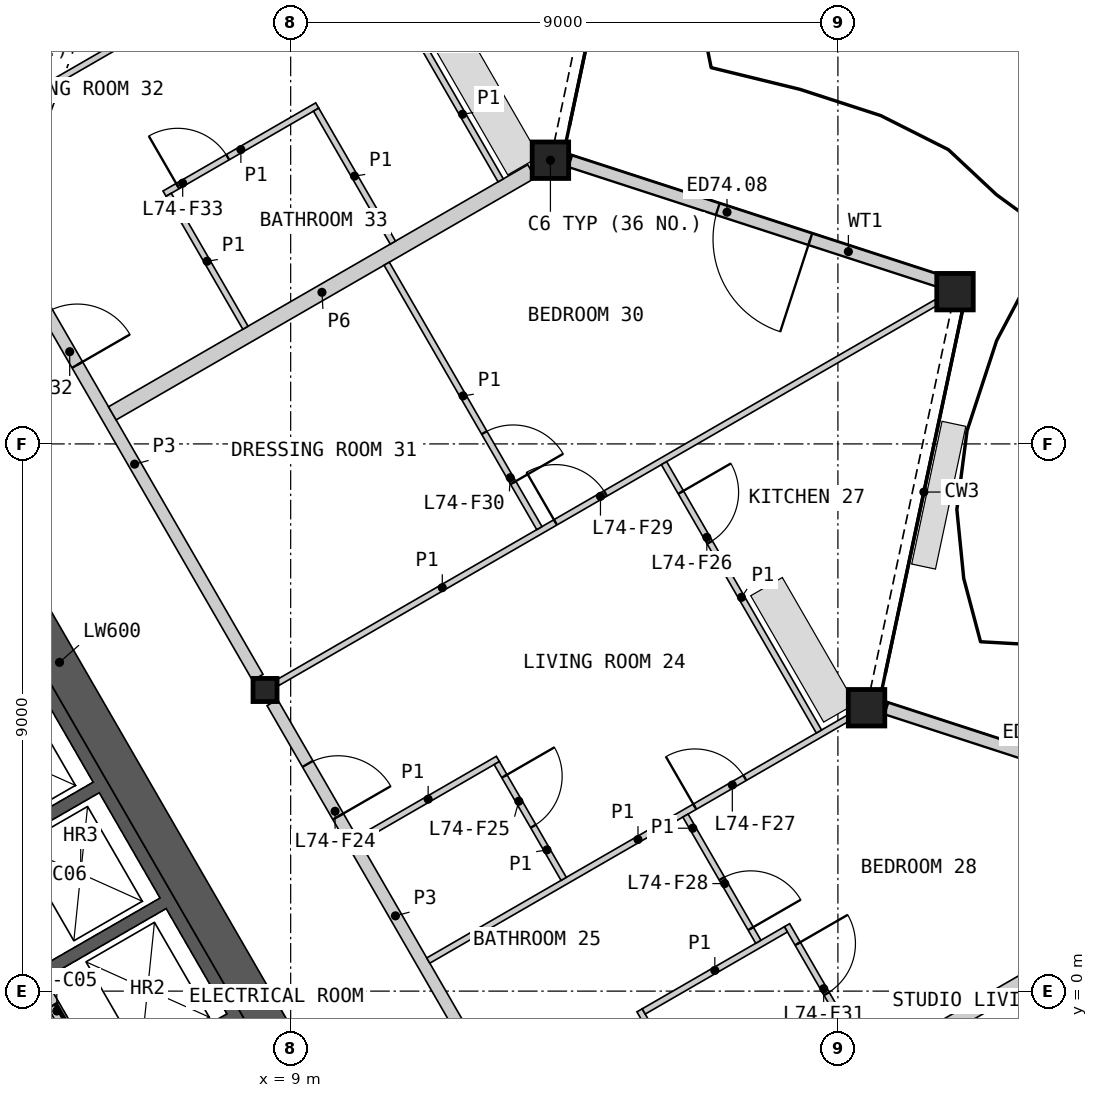
"""IFC4 building model, lengths in metres.
Left out: names, types, materials, properties, quantities, classifications, styles, units other than length and angle.
Written with IfcOpenShell. Run it as: python <this file> out.ifc"""

import sys

from ifc_helpers import new_model, si_unit, direction, frame, frame_2d, origin, origin_2d, place, context, subcontext, project, spatial, polyline, rectangle, hollow_rectangle, i_section, outline, extrude, element, fill, save


model = new_model("IFC4")
c1 = context("Model", 3, precision=1e-05, world=origin(), true_north=direction((0.0, 1.0)))
c2 = subcontext(c1, "Body", "Model", "MODEL_VIEW")
j1 = project(units=[si_unit("LENGTHUNIT", "METRE"), si_unit("PLANEANGLEUNIT", "RADIAN")], contexts=[c1])
p1 = place(None, origin())
s1 = spatial("IfcSite", under=j1, at=p1, CompositionType="ELEMENT")
p2 = place(p1, origin())
s2 = spatial("IfcBuilding", under=s1, at=p2, CompositionType="ELEMENT")
p3 = place(p2, frame((0.0, 0.0, 332.4)))
s3 = spatial("IfcBuildingStorey", under=s2, at=p3, CompositionType="ELEMENT", Elevation=332.4)
for number, where, z_axis, x_axis in (
    (1, (18.471, 4.661, 0.0), (0.0, 0.0, 1.0), (1.0, 0.0, 0.0)),
    (2, (19.926, 11.504, 0.0), (0.0, 0.0, 1.0), (1.0, 0.0, 0.0)),
    (3, (13.272, 13.666, 0.0), (0.0, 0.0, 1.0), (1.0, 0.0, 0.0)),
):
    element("IfcColumn", number, at=place(p3, frame(where, z_axis=z_axis, x_axis=x_axis)), inside=s3, PredefinedType="COLUMN", context=c2, shape_type="SweptSolid", body=[
        extrude(hollow_rectangle(XDim=0.6, YDim=0.6, WallThickness=0.04, at=origin_2d()), origin(), (0.0, 0.0, 1.0), 3.4),
    ])
p4 = place(p3, frame((8.578, 4.953, 0.0), z_axis=(0.0, 0.0, 1.0), x_axis=(1.0, 0.0, 0.0)))
e4 = element("IfcColumn", 4, at=p4, inside=s3, PredefinedType="COLUMN", context=c2, shape_type="SweptSolid", body=[
    extrude(i_section(OverallWidth=0.396, OverallDepth=0.381, WebThickness=0.019, FlangeThickness=0.03, at=origin_2d()), origin(), (0.0, 0.0, 1.0), 3.4),
])
p5 = place(p3, frame((24.893, 2.667, 0.0), z_axis=(0.0, 0.0, 1.0), x_axis=(-0.951058691075, 0.309010301012, 0.0)))
e5 = element("IfcWall", 5, at=p5, inside=s3, PredefinedType="SOLIDWALL", context=c2, shape_type="SweptSolid", body=[
    extrude(rectangle(XDim=6.411, YDim=0.2, at=frame_2d((3.206, 0.0))), origin(), (0.0, 0.0, 1.0), 2.488),
])
p6 = place(p5, frame((2.262, 0.0, 0.0)))
e6 = element("IfcOpeningElement", 6, at=p6, cuts=e5, PredefinedType="OPENING", context=c2, shape_type="SweptSolid", body=[
    extrude(rectangle(XDim=1.6, YDim=2.25, at=frame_2d((0.8, 1.125))), frame((0.0, 0.11, 0.0), z_axis=(0.0, -1.0, 0.0), x_axis=(1.0, 0.0, 0.0)), (0.0, 0.0, 1.0), 0.22),
])
p7 = place(p3, frame((19.697, 11.667, 0.0), z_axis=(0.0, 0.0, 1.0), x_axis=(-0.951053926112, 0.309024966026, 0.0)))
e7 = element("IfcWall", 7, at=p7, inside=s3, PredefinedType="SOLIDWALL", context=c2, shape_type="SweptSolid", body=[
    extrude(rectangle(XDim=6.414, YDim=0.2, at=frame_2d((3.207, 0.0))), origin(), (0.0, 0.0, 1.0), 2.488),
])
p8 = place(p7, frame((2.262, 0.0, 0.0)))
e8 = element("IfcOpeningElement", 8, at=p8, cuts=e7, PredefinedType="OPENING", context=c2, shape_type="SweptSolid", body=[
    extrude(rectangle(XDim=1.6, YDim=2.25, at=frame_2d((0.8, 1.125))), frame((0.0, 0.11, 0.0), z_axis=(0.0, -1.0, 0.0), x_axis=(1.0, 0.0, 0.0)), (0.0, 0.0, 1.0), 0.22),
])
p9 = place(p3, origin())
e9 = element("IfcWall", 9, at=p9, inside=s3, PredefinedType="SHEAR", context=c2, shape_type="SweptSolid", body=[
    extrude(outline(polyline([(1.561, 6.097), (3.731, 7.35), (8.231, -0.444), (6.061, -1.697), (5.96, -1.524), (7.952, -0.374), (6.952, 1.358), (4.96, 0.208), (4.861, 0.381), (6.852, 1.531), (5.852, 3.263), (3.861, 2.113), (3.76, 2.287), (5.752, 3.437), (4.752, 5.169), (2.76, 4.019), (2.66, 4.192), (4.652, 5.342), (3.652, 7.074), (1.66, 5.924), (1.561, 6.097)])), origin(), (0.0, 0.0, 1.0), 3.1),
])
p10 = place(p3, frame((5.817, -1.476, 0.0), z_axis=(0.0, 0.0, 1.0), x_axis=(-0.500002616675, 0.866023893041, 0.0)))
e10 = element("IfcWall", 10, at=p10, inside=s3, PredefinedType="SOLIDWALL", context=c2, shape_type="SweptSolid", body=[
    extrude(rectangle(XDim=8.373, YDim=0.2, at=frame_2d((4.187, 0.0))), origin(), (0.0, 0.0, 1.0), 3.1),
])
p11 = place(p10, frame((0.337, 0.0, 0.0)))
e11 = element("IfcOpeningElement", 11, at=p11, cuts=e10, PredefinedType="OPENING", context=c2, shape_type="SweptSolid", body=[
    extrude(rectangle(XDim=1.1, YDim=2.1, at=frame_2d((0.55, 1.05))), frame((0.0, 0.11, 0.0), z_axis=(0.0, -1.0, 0.0), x_axis=(1.0, 0.0, 0.0)), (0.0, 0.0, 1.0), 0.22),
])
p12 = place(p10, frame((2.537, 0.0, 0.0)))
e12 = element("IfcOpeningElement", 12, at=p12, cuts=e10, PredefinedType="OPENING", context=c2, shape_type="SweptSolid", body=[
    extrude(rectangle(XDim=1.1, YDim=2.1, at=frame_2d((0.55, 1.05))), frame((0.0, 0.11, 0.0), z_axis=(0.0, -1.0, 0.0), x_axis=(1.0, 0.0, 0.0)), (0.0, 0.0, 1.0), 0.22),
])
p13 = place(p10, frame((4.737, 0.0, 0.0)))
e13 = element("IfcOpeningElement", 13, at=p13, cuts=e10, PredefinedType="OPENING", context=c2, shape_type="SweptSolid", body=[
    extrude(rectangle(XDim=1.1, YDim=2.1, at=frame_2d((0.55, 1.05))), frame((0.0, 0.11, 0.0), z_axis=(0.0, -1.0, 0.0), x_axis=(1.0, 0.0, 0.0)), (0.0, 0.0, 1.0), 0.22),
])
p14 = place(p10, frame((7.037, 0.0, 0.0)))
e14 = element("IfcOpeningElement", 14, at=p14, cuts=e10, PredefinedType="OPENING", context=c2, shape_type="SweptSolid", body=[
    extrude(rectangle(XDim=0.9, YDim=2.1, at=frame_2d((0.45, 1.05))), frame((0.0, 0.11, 0.0), z_axis=(0.0, -1.0, 0.0), x_axis=(1.0, 0.0, 0.0)), (0.0, 0.0, 1.0), 0.22),
])
p15 = place(p3, frame((8.841, -0.902, 0.0), z_axis=(0.0, 0.0, 1.0), x_axis=(-0.499995618375, 0.866027933502, 0.0)))
e15 = element("IfcWall", 15, at=p15, inside=s3, PredefinedType="SHEAR", context=c2, shape_type="SweptSolid", body=[
    extrude(rectangle(XDim=14.571, YDim=0.6, at=frame_2d((7.285, 0.0))), origin(), (0.0, 0.0, 1.0), 3.1),
])
p16 = place(p3, frame((4.409, 12.174, 0.0), z_axis=(0.0, 0.0, 1.0), x_axis=(0.499984266882, -0.866034487114, 0.0)))
e16 = element("IfcWall", 16, at=p16, inside=s3, PredefinedType="PARTITIONING", context=c2, shape_type="SweptSolid", body=[
    extrude(rectangle(XDim=8.099, YDim=0.2, at=frame_2d((4.049, 0.0))), origin(), (0.0, 0.0, 1.0), 3.1),
])
p17 = place(p16, frame((1.164, 0.0, 0.0)))
e17 = element("IfcOpeningElement", 17, at=p17, cuts=e16, PredefinedType="OPENING", context=c2, shape_type="SweptSolid", body=[
    extrude(rectangle(XDim=1.0, YDim=2.1, at=frame_2d((0.5, 1.05))), frame((0.0, 0.11, 0.0), z_axis=(0.0, -1.0, 0.0), x_axis=(1.0, 0.0, 0.0)), (0.0, 0.0, 1.0), 0.22),
])
p18 = place(p3, frame((8.698, 4.745, 0.0), z_axis=(0.0, 0.0, 1.0), x_axis=(0.499984266882, -0.866034487114, 0.0)))
e18 = element("IfcWall", 18, at=p18, inside=s3, PredefinedType="PARTITIONING", context=c2, shape_type="SweptSolid", body=[
    extrude(rectangle(XDim=8.099, YDim=0.2, at=frame_2d((4.049, 0.0))), origin(), (0.0, 0.0, 1.0), 3.1),
])
p19 = place(p18, frame((1.164, 0.0, 0.0)))
e19 = element("IfcOpeningElement", 19, at=p19, cuts=e18, PredefinedType="OPENING", context=c2, shape_type="SweptSolid", body=[
    extrude(rectangle(XDim=1.0, YDim=2.1, at=frame_2d((0.5, 1.05))), frame((0.0, 0.11, 0.0), z_axis=(0.0, -1.0, 0.0), x_axis=(1.0, 0.0, 0.0)), (0.0, 0.0, 1.0), 0.22),
])
p20 = place(p3, frame((6.067, 9.503, 0.0), z_axis=(0.0, 0.0, 1.0), x_axis=(0.866032392051, 0.499987895772, 0.0)))
e20 = element("IfcWall", 20, at=p20, inside=s3, PredefinedType="PARTITIONING", context=c2, shape_type="SweptSolid", body=[
    extrude(rectangle(XDim=7.962, YDim=0.25, at=frame_2d((3.981, 0.0))), origin(), (0.0, 0.0, 1.0), 2.33),
])
p21 = place(p3, frame((18.581, -1.272, 0.0), z_axis=(0.0, 0.0, 1.0), x_axis=(0.866024038922, 0.500002364004, 0.0)))
e21 = element("IfcWall", 21, at=p21, inside=s3, PredefinedType="PARTITIONING", context=c2, shape_type="SweptSolid", body=[
    extrude(rectangle(XDim=7.198, YDim=0.25, at=frame_2d((3.599, 0.0))), origin(), (0.0, 0.0, 1.0), 2.33),
])
p22 = place(p3, frame((3.469, 14.003, 0.0), z_axis=(0.0, 0.0, 1.0), x_axis=(0.866021563384, 0.50000665171, 0.0)))
e22 = element("IfcWall", 22, at=p22, inside=s3, PredefinedType="PARTITIONING", context=c2, shape_type="SweptSolid", body=[
    extrude(rectangle(XDim=12.641, YDim=0.1, at=frame_2d((6.321, 0.0))), origin(), (0.0, 0.0, 1.0), 2.33),
])
p23 = place(p22, frame((8.215, 0.0, 0.0)))
e23 = element("IfcOpeningElement", 23, at=p23, cuts=e22, PredefinedType="OPENING", context=c2, shape_type="SweptSolid", body=[
    extrude(rectangle(XDim=0.95, YDim=2.1, at=frame_2d((0.475, 1.05))), frame((0.0, 0.06, 0.0), z_axis=(0.0, -1.0, 0.0), x_axis=(1.0, 0.0, 0.0)), (0.0, 0.0, 1.0), 0.12),
])
p24 = place(p3, frame((8.786, 5.073, 0.0), z_axis=(0.0, 0.0, 1.0), x_axis=(0.86602139559, 0.500006942333, 0.0)))
e24 = element("IfcWall", 24, at=p24, inside=s3, PredefinedType="PARTITIONING", context=c2, shape_type="SweptSolid", body=[
    extrude(rectangle(XDim=12.505, YDim=0.1, at=frame_2d((6.252, 0.0))), origin(), (0.0, 0.0, 1.0), 2.33),
])
p25 = place(p24, frame((5.275, 0.0, 0.0)))
e25 = element("IfcOpeningElement", 25, at=p25, cuts=e24, PredefinedType="OPENING", context=c2, shape_type="SweptSolid", body=[
    extrude(rectangle(XDim=0.95, YDim=2.1, at=frame_2d((0.475, 1.05))), frame((0.0, 0.06, 0.0), z_axis=(0.0, -1.0, 0.0), x_axis=(1.0, 0.0, 0.0)), (0.0, 0.0, 1.0), 0.12),
])
p26 = place(p3, frame((11.263, 0.503, 0.0), z_axis=(0.0, 0.0, 1.0), x_axis=(0.866023773276, 0.500002824113, 0.0)))
e26 = element("IfcWall", 26, at=p26, inside=s3, PredefinedType="PARTITIONING", context=c2, shape_type="SweptSolid", body=[
    extrude(rectangle(XDim=7.965, YDim=0.1, at=frame_2d((3.982, 0.0))), origin(), (0.0, 0.0, 1.0), 2.33),
])
p27 = place(p26, frame((5.061, 0.0, 0.0)))
e27 = element("IfcOpeningElement", 27, at=p27, cuts=e26, PredefinedType="OPENING", context=c2, shape_type="SweptSolid", body=[
    extrude(rectangle(XDim=0.95, YDim=2.1, at=frame_2d((0.475, 1.05))), frame((0.0, 0.06, 0.0), z_axis=(0.0, -1.0, 0.0), x_axis=(1.0, 0.0, 0.0)), (0.0, 0.0, 1.0), 0.12),
])
p28 = place(p3, frame((14.738, -0.316, 0.0), z_axis=(0.0, 0.0, 1.0), x_axis=(0.499996545922, -0.866027397988, 0.0)))
e28 = element("IfcWall", 28, at=p28, inside=s3, PredefinedType="PARTITIONING", context=c2, shape_type="SweptSolid", body=[
    extrude(rectangle(XDim=5.5, YDim=0.1, at=frame_2d((2.75, 0.0))), origin(), (0.0, 0.0, 1.0), 2.33),
])
p29 = place(p3, frame((17.163, 1.084, 0.0), z_axis=(0.0, 0.0, 1.0), x_axis=(0.500015767406, -0.866016300277, 0.0)))
e29 = element("IfcWall", 29, at=p29, inside=s3, PredefinedType="PARTITIONING", context=c2, shape_type="SweptSolid", body=[
    extrude(rectangle(XDim=5.5, YDim=0.1, at=frame_2d((2.75, 0.0))), origin(), (0.0, 0.0, 1.0), 2.33),
])
p30 = place(p29, frame((4.3, 0.0, 0.0)))
e30 = element("IfcOpeningElement", 30, at=p30, cuts=e29, PredefinedType="OPENING", context=c2, shape_type="SweptSolid", body=[
    extrude(rectangle(XDim=0.95, YDim=2.1, at=frame_2d((0.475, 1.05))), frame((0.0, 0.06, 0.0), z_axis=(0.0, -1.0, 0.0), x_axis=(1.0, 0.0, 0.0)), (0.0, 0.0, 1.0), 0.12),
])
p31 = place(p29, frame((0.351, 0.0, 0.0)))
e31 = element("IfcOpeningElement", 31, at=p31, cuts=e29, PredefinedType="OPENING", context=c2, shape_type="SweptSolid", body=[
    extrude(rectangle(XDim=0.95, YDim=2.1, at=frame_2d((0.475, 1.05))), frame((0.0, 0.06, 0.0), z_axis=(0.0, -1.0, 0.0), x_axis=(1.0, 0.0, 0.0)), (0.0, 0.0, 1.0), 0.12),
])
p32 = place(p3, frame((10.579, 11.964, 0.0), z_axis=(0.0, 0.0, 1.0), x_axis=(0.499972176429, -0.866041467135, 0.0)))
e32 = element("IfcWall", 32, at=p32, inside=s3, PredefinedType="PARTITIONING", context=c2, shape_type="SweptSolid", body=[
    extrude(rectangle(XDim=5.021, YDim=0.1, at=frame_2d((2.511, 0.0))), origin(), (0.0, 0.0, 1.0), 2.33),
])
p33 = place(p32, frame((3.209, 0.0, 0.0)))
e33 = element("IfcOpeningElement", 33, at=p33, cuts=e32, PredefinedType="OPENING", context=c2, shape_type="SweptSolid", body=[
    extrude(rectangle(XDim=0.95, YDim=2.1, at=frame_2d((0.475, 1.05))), frame((0.0, 0.06, 0.0), z_axis=(0.0, -1.0, 0.0), x_axis=(1.0, 0.0, 0.0)), (0.0, 0.0, 1.0), 0.12),
])
p34 = place(p3, frame((9.944, 17.684, 0.0), z_axis=(0.0, 0.0, 1.0), x_axis=(0.499972176429, -0.866041467135, 0.0)))
e34 = element("IfcWall", 34, at=p34, inside=s3, PredefinedType="PARTITIONING", context=c2, shape_type="SweptSolid", body=[
    extrude(rectangle(XDim=5.021, YDim=0.1, at=frame_2d((2.511, 0.0))), origin(), (0.0, 0.0, 1.0), 2.33),
])
p35 = place(p34, frame((0.964, 0.0, 0.0)))
e35 = element("IfcOpeningElement", 35, at=p35, cuts=e34, PredefinedType="OPENING", context=c2, shape_type="SweptSolid", body=[
    extrude(rectangle(XDim=0.95, YDim=2.1, at=frame_2d((0.475, 1.05))), frame((0.0, 0.06, 0.0), z_axis=(0.0, -1.0, 0.0), x_axis=(1.0, 0.0, 0.0)), (0.0, 0.0, 1.0), 0.12),
])
p36 = place(p3, frame((15.14, 8.683, 0.0), z_axis=(0.0, 0.0, 1.0), x_axis=(0.499987849973, -0.866032418492, 0.0)))
e36 = element("IfcWall", 36, at=p36, inside=s3, PredefinedType="PARTITIONING", context=c2, shape_type="SweptSolid", body=[
    extrude(rectangle(XDim=5.096, YDim=0.1, at=frame_2d((2.548, 0.0))), origin(), (0.0, 0.0, 1.0), 2.33),
])
p37 = place(p36, frame((0.554, 0.0, 0.0)))
e37 = element("IfcOpeningElement", 37, at=p37, cuts=e36, PredefinedType="OPENING", context=c2, shape_type="SweptSolid", body=[
    extrude(rectangle(XDim=0.95, YDim=2.1, at=frame_2d((0.475, 1.05))), frame((0.0, 0.06, 0.0), z_axis=(0.0, -1.0, 0.0), x_axis=(1.0, 0.0, 0.0)), (0.0, 0.0, 1.0), 0.12),
])
p38 = place(p3, frame((6.925, 13.116, 0.0), z_axis=(0.0, 0.0, 1.0), x_axis=(0.866032775405, 0.499987231761, 0.0)))
e38 = element("IfcWall", 38, at=p38, inside=s3, PredefinedType="PARTITIONING", context=c2, shape_type="SweptSolid", body=[
    extrude(rectangle(XDim=2.9, YDim=0.1, at=frame_2d((1.45, 0.0))), origin(), (0.0, 0.0, 1.0), 2.33),
])
p39 = place(p38, frame((0.25, 0.0, 0.0)))
e39 = element("IfcOpeningElement", 39, at=p39, cuts=e38, PredefinedType="OPENING", context=c2, shape_type="SweptSolid", body=[
    extrude(rectangle(XDim=0.95, YDim=2.1, at=frame_2d((0.475, 1.05))), frame((0.0, 0.06, 0.0), z_axis=(0.0, -1.0, 0.0), x_axis=(1.0, 0.0, 0.0)), (0.0, 0.0, 1.0), 0.12),
])
p40 = place(p3, frame((14.806, -0.334, 0.0), z_axis=(0.0, 0.0, 1.0), x_axis=(0.86599734893, 0.500048589285, 0.0)))
e40 = element("IfcWall", 40, at=p40, inside=s3, PredefinedType="PARTITIONING", context=c2, shape_type="SweptSolid", body=[
    extrude(rectangle(XDim=2.7, YDim=0.1, at=frame_2d((1.35, 0.0))), origin(), (0.0, 0.0, 1.0), 2.33),
])
p41 = place(p3, frame((10.113, 2.494, 0.0), z_axis=(0.0, 0.0, 1.0), x_axis=(0.865989200783, 0.500062700197, 0.0)))
e41 = element("IfcWall", 41, at=p41, inside=s3, PredefinedType="PARTITIONING", context=c2, shape_type="SweptSolid", body=[
    extrude(rectangle(XDim=2.65, YDim=0.1, at=frame_2d((1.325, 0.0))), origin(), (0.0, 0.0, 1.0), 2.33),
])
for number, where, z_axis, x_axis in (
    (42, (9.418, 14.498, 0.0), (0.0, 0.0, 1.0), (0.5, -0.866, 0.0)),
    (43, (6.994, 13.098, 0.0), (0.0, 0.0, 1.0), (0.5, -0.866, 0.0)),
):
    element("IfcWall", number, at=place(p3, frame(where, z_axis=z_axis, x_axis=x_axis)), inside=s3, PredefinedType="PARTITIONING", context=c2, shape_type="SweptSolid", body=[
        extrude(rectangle(XDim=2.525, YDim=0.1, at=frame_2d((1.262, 0.0))), origin(), (0.0, 0.0, 1.0), 2.33),
    ])
p42 = place(p3, frame((15.493, 2.887, 0.0), z_axis=(0.0, 0.0, 1.0), x_axis=(0.499963527173, -0.866046460357, 0.0)))
e44 = element("IfcWall", 44, at=p42, inside=s3, PredefinedType="PARTITIONING", context=c2, shape_type="SweptSolid", body=[
    extrude(rectangle(XDim=2.396, YDim=0.1, at=frame_2d((1.198, 0.0))), origin(), (0.0, 0.0, 1.0), 2.33),
])
p43 = place(p42, frame((1.196, 0.0, 0.0)))
e45 = element("IfcOpeningElement", 45, at=p43, cuts=e44, PredefinedType="OPENING", context=c2, shape_type="SweptSolid", body=[
    extrude(rectangle(XDim=0.95, YDim=2.1, at=frame_2d((0.475, 1.05))), frame((0.0, 0.06, 0.0), z_axis=(0.0, -1.0, 0.0), x_axis=(1.0, 0.0, 0.0)), (0.0, 0.0, 1.0), 0.12),
])
p44 = place(p3, frame((12.39, 3.751, 0.0), z_axis=(0.0, 0.0, 1.0), x_axis=(0.50002983664, -0.866008176907, 0.0)))
e46 = element("IfcWall", 46, at=p44, inside=s3, PredefinedType="PARTITIONING", context=c2, shape_type="SweptSolid", body=[
    extrude(rectangle(XDim=2.2, YDim=0.1, at=frame_2d((1.1, 0.0))), origin(), (0.0, 0.0, 1.0), 2.33),
])
p45 = place(p44, frame((0.25, 0.0, 0.0)))
e47 = element("IfcOpeningElement", 47, at=p45, cuts=e46, PredefinedType="OPENING", context=c2, shape_type="SweptSolid", body=[
    extrude(rectangle(XDim=0.95, YDim=2.1, at=frame_2d((0.475, 1.05))), frame((0.0, 0.06, 0.0), z_axis=(0.0, -1.0, 0.0), x_axis=(1.0, 0.0, 0.0)), (0.0, 0.0, 1.0), 0.12),
])
p46 = place(p8, origin())
e48 = element("IfcDoor", 48, at=p46, inside=s3, OperationType="DOUBLE_DOOR_SINGLE_SWING", PredefinedType="DOOR", context=c2, shape_type="SweptSolid", body=[
    extrude(rectangle(XDim=1.6, YDim=2.25, at=frame_2d((0.8, 1.125))), frame((0.0, 0.025, 0.0), z_axis=(0.0, -1.0, 0.0), x_axis=(1.0, 0.0, 0.0)), (0.0, 0.0, 1.0), 0.05),
])
fill(e8, e48)
p47 = place(p11, origin())
e49 = element("IfcDoor", 49, at=p47, inside=s3, OperationType="SLIDING_TO_LEFT", PredefinedType="DOOR", context=c2, shape_type="SweptSolid", body=[
    extrude(rectangle(XDim=1.1, YDim=2.1, at=frame_2d((0.55, 1.05))), frame((0.0, 0.025, 0.0), z_axis=(0.0, -1.0, 0.0), x_axis=(1.0, 0.0, 0.0)), (0.0, 0.0, 1.0), 0.05),
])
fill(e11, e49)
p48 = place(p19, origin())
e50 = element("IfcDoor", 50, at=p48, inside=s3, OperationType="SINGLE_SWING_RIGHT", PredefinedType="DOOR", context=c2, shape_type="SweptSolid", body=[
    extrude(rectangle(XDim=1.0, YDim=2.1, at=frame_2d((0.5, 1.05))), frame((0.0, 0.025, 0.0), z_axis=(0.0, -1.0, 0.0), x_axis=(1.0, 0.0, 0.0)), (0.0, 0.0, 1.0), 0.05),
])
fill(e19, e50)
p49 = place(p45, origin())
e51 = element("IfcDoor", 51, at=p49, inside=s3, OperationType="SINGLE_SWING_LEFT", PredefinedType="DOOR", context=c2, shape_type="SweptSolid", body=[
    extrude(rectangle(XDim=0.95, YDim=2.1, at=frame_2d((0.475, 1.05))), frame((0.0, 0.025, 0.0), z_axis=(0.0, -1.0, 0.0), x_axis=(1.0, 0.0, 0.0)), (0.0, 0.0, 1.0), 0.05),
])
fill(e47, e51)
p50 = place(p37, origin())
e52 = element("IfcDoor", 52, at=p50, inside=s3, OperationType="SINGLE_SWING_LEFT", PredefinedType="DOOR", context=c2, shape_type="SweptSolid", body=[
    extrude(rectangle(XDim=0.95, YDim=2.1, at=frame_2d((0.475, 1.05))), frame((0.0, 0.025, 0.0), z_axis=(0.0, -1.0, 0.0), x_axis=(1.0, 0.0, 0.0)), (0.0, 0.0, 1.0), 0.05),
])
fill(e37, e52)
p51 = place(p27, origin())
e53 = element("IfcDoor", 53, at=p51, inside=s3, OperationType="SINGLE_SWING_LEFT", PredefinedType="DOOR", context=c2, shape_type="SweptSolid", body=[
    extrude(rectangle(XDim=0.95, YDim=2.1, at=frame_2d((0.475, 1.05))), frame((0.0, 0.025, 0.0), z_axis=(0.0, -1.0, 0.0), x_axis=(1.0, 0.0, 0.0)), (0.0, 0.0, 1.0), 0.05),
])
fill(e27, e53)
p52 = place(p43, origin())
e54 = element("IfcDoor", 54, at=p52, inside=s3, OperationType="SINGLE_SWING_RIGHT", PredefinedType="DOOR", context=c2, shape_type="SweptSolid", body=[
    extrude(rectangle(XDim=0.95, YDim=2.1, at=frame_2d((0.475, 1.05))), frame((0.0, 0.025, 0.0), z_axis=(0.0, -1.0, 0.0), x_axis=(1.0, 0.0, 0.0)), (0.0, 0.0, 1.0), 0.05),
])
fill(e45, e54)
p53 = place(p25, origin())
e55 = element("IfcDoor", 55, at=p53, inside=s3, OperationType="SINGLE_SWING_LEFT", PredefinedType="DOOR", context=c2, shape_type="SweptSolid", body=[
    extrude(rectangle(XDim=0.95, YDim=2.1, at=frame_2d((0.475, 1.05))), frame((0.0, 0.025, 0.0), z_axis=(0.0, -1.0, 0.0), x_axis=(1.0, 0.0, 0.0)), (0.0, 0.0, 1.0), 0.05),
])
fill(e25, e55)
p54 = place(p33, origin())
e56 = element("IfcDoor", 56, at=p54, inside=s3, OperationType="SINGLE_SWING_RIGHT", PredefinedType="DOOR", context=c2, shape_type="SweptSolid", body=[
    extrude(rectangle(XDim=0.95, YDim=2.1, at=frame_2d((0.475, 1.05))), frame((0.0, 0.025, 0.0), z_axis=(0.0, -1.0, 0.0), x_axis=(1.0, 0.0, 0.0)), (0.0, 0.0, 1.0), 0.05),
])
fill(e33, e56)
p55 = place(p31, origin())
e57 = element("IfcDoor", 57, at=p55, inside=s3, OperationType="SINGLE_SWING_LEFT", PredefinedType="DOOR", context=c2, shape_type="SweptSolid", body=[
    extrude(rectangle(XDim=0.95, YDim=2.1, at=frame_2d((0.475, 1.05))), frame((0.0, 0.025, 0.0), z_axis=(0.0, -1.0, 0.0), x_axis=(1.0, 0.0, 0.0)), (0.0, 0.0, 1.0), 0.05),
])
fill(e31, e57)
p56 = place(p17, origin())
e58 = element("IfcDoor", 58, at=p56, inside=s3, OperationType="SINGLE_SWING_RIGHT", PredefinedType="DOOR", context=c2, shape_type="SweptSolid", body=[
    extrude(rectangle(XDim=1.0, YDim=2.1, at=frame_2d((0.5, 1.05))), frame((0.0, 0.025, 0.0), z_axis=(0.0, -1.0, 0.0), x_axis=(1.0, 0.0, 0.0)), (0.0, 0.0, 1.0), 0.05),
])
fill(e17, e58)
p57 = place(p39, origin())
e59 = element("IfcDoor", 59, at=p57, inside=s3, OperationType="SINGLE_SWING_LEFT", PredefinedType="DOOR", context=c2, shape_type="SweptSolid", body=[
    extrude(rectangle(XDim=0.95, YDim=2.1, at=frame_2d((0.475, 1.05))), frame((0.0, 0.025, 0.0), z_axis=(0.0, -1.0, 0.0), x_axis=(1.0, 0.0, 0.0)), (0.0, 0.0, 1.0), 0.05),
])
fill(e39, e59)
save(model, sys.argv[1])
